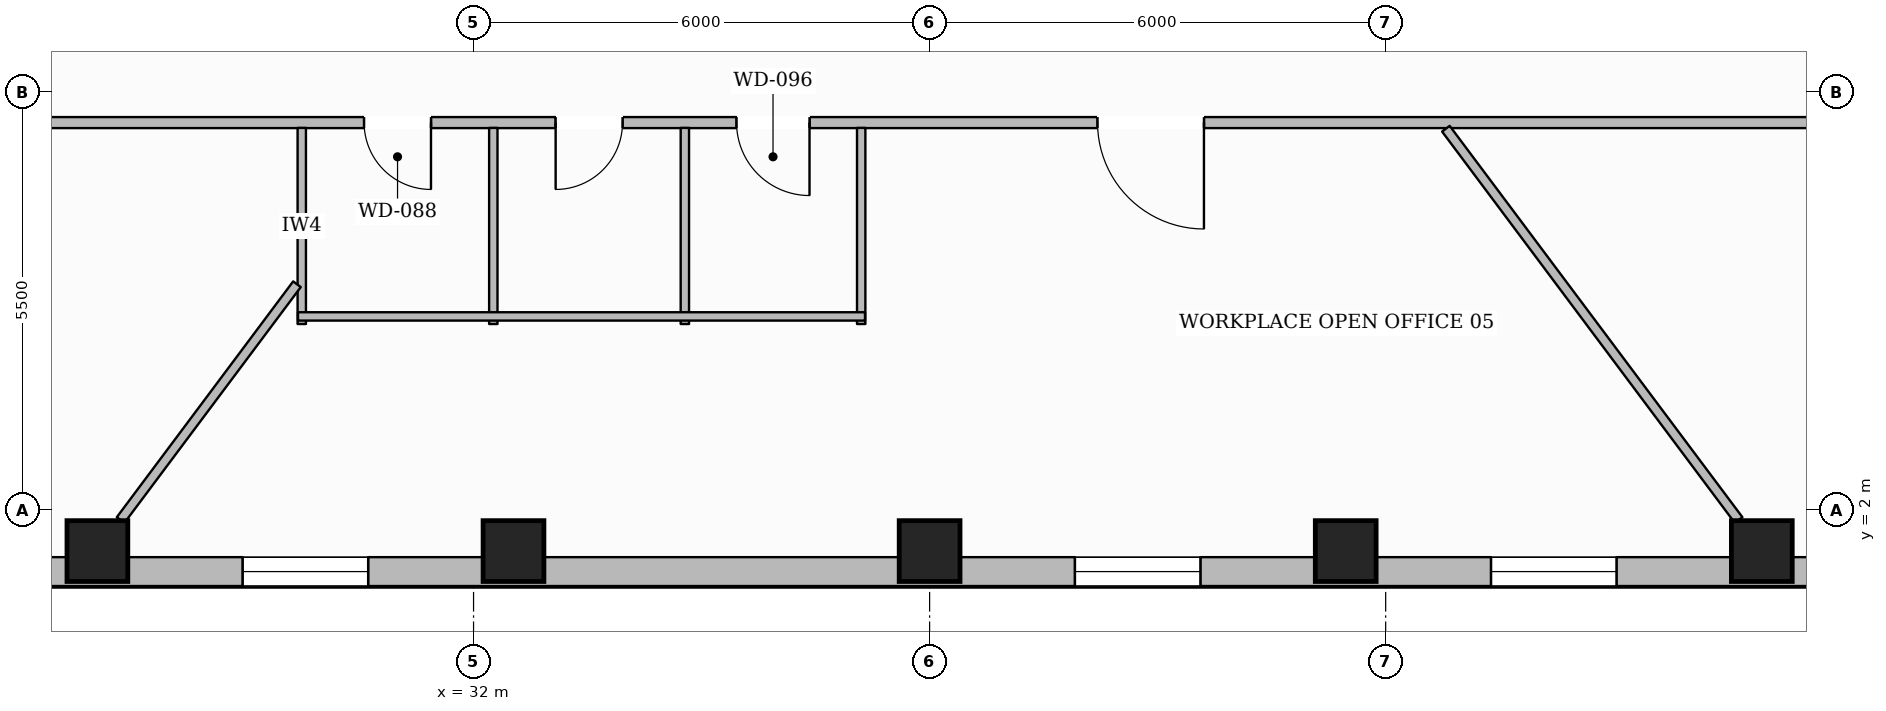
"""IFC4 building model, lengths in metres.
Left out: names, types, materials, properties, quantities, classifications, styles, units other than length and angle.
Written with IfcOpenShell. Run it as: python <this file> out.ifc"""

import sys

from ifc_helpers import new_model, si_unit, direction, frame, frame_2d, origin, origin_2d, place, context, subcontext, project, spatial, rectangle, hollow_rectangle, extrude, element, fill, save


model = new_model("IFC4")
c1 = context("Model", 3, precision=1e-05, world=origin(), true_north=direction((0.0, 1.0)))
c2 = subcontext(c1, "Body", "Model", "MODEL_VIEW")
j1 = project(units=[si_unit("LENGTHUNIT", "METRE"), si_unit("PLANEANGLEUNIT", "RADIAN")], contexts=[c1])
p1 = place(None, origin())
s1 = spatial("IfcSite", under=j1, at=p1, CompositionType="ELEMENT")
p2 = place(p1, origin())
s2 = spatial("IfcBuilding", under=s1, at=p2, CompositionType="ELEMENT")
p3 = place(p2, frame((0.0, 0.0, 29.1)))
s3 = spatial("IfcBuildingStorey", under=s2, at=p3, CompositionType="ELEMENT", Elevation=29.1)
for number, where, z_axis, x_axis in (
    (1, (27.051, 1.463, 0.0), (0.0, 0.0, 1.0), (1.0, 0.0, 0.0)),
    (2, (32.526, 1.463, 0.0), (0.0, 0.0, 1.0), (1.0, 0.0, 0.0)),
    (3, (38.0, 1.463, 0.0), (0.0, 0.0, 1.0), (1.0, 0.0, 0.0)),
    (4, (43.474, 1.463, 0.0), (0.0, 0.0, 1.0), (1.0, 0.0, 0.0)),
    (5, (48.949, 1.463, 0.0), (0.0, 0.0, 1.0), (1.0, 0.0, 0.0)),
):
    element("IfcColumn", number, at=place(p3, frame(where, z_axis=z_axis, x_axis=x_axis)), inside=s3, PredefinedType="COLUMN", context=c2, shape_type="SweptSolid", body=[
        extrude(hollow_rectangle(XDim=0.8, YDim=0.8, WallThickness=0.036, at=origin_2d()), origin(), (0.0, 0.0, 1.0), 3.59),
    ])
p4 = place(p3, frame((54.902, 1.193, 0.0), z_axis=(0.0, 0.0, 1.0), x_axis=(-1.0, 0.0, 0.0)))
e6 = element("IfcWall", 6, at=p4, inside=s3, PredefinedType="STANDARD", context=c2, shape_type="SweptSolid", body=[
    extrude(rectangle(XDim=33.804, YDim=0.38, at=frame_2d((16.902, 0.0))), origin(), (0.0, 0.0, 1.0), 2.97),
])
p5 = place(p4, frame((29.763, 0.0, 0.65)))
e7 = element("IfcOpeningElement", 7, at=p5, cuts=e6, PredefinedType="OPENING", context=c2, shape_type="SweptSolid", body=[
    extrude(rectangle(XDim=1.65, YDim=1.75, at=frame_2d((0.825, 0.875))), frame((0.0, 0.2, 0.0), z_axis=(0.0, -1.0, 0.0), x_axis=(1.0, 0.0, 0.0)), (0.0, 0.0, 1.0), 0.4),
])
p6 = place(p4, frame((24.288, 0.0, 0.65)))
e8 = element("IfcOpeningElement", 8, at=p6, cuts=e6, PredefinedType="OPENING", context=c2, shape_type="SweptSolid", body=[
    extrude(rectangle(XDim=1.65, YDim=1.75, at=frame_2d((0.825, 0.875))), frame((0.0, 0.2, 0.0), z_axis=(0.0, -1.0, 0.0), x_axis=(1.0, 0.0, 0.0)), (0.0, 0.0, 1.0), 0.4),
])
p7 = place(p4, frame((13.34, 0.0, 0.65)))
e9 = element("IfcOpeningElement", 9, at=p7, cuts=e6, PredefinedType="OPENING", context=c2, shape_type="SweptSolid", body=[
    extrude(rectangle(XDim=1.65, YDim=1.75, at=frame_2d((0.825, 0.875))), frame((0.0, 0.2, 0.0), z_axis=(0.0, -1.0, 0.0), x_axis=(1.0, 0.0, 0.0)), (0.0, 0.0, 1.0), 0.4),
])
p8 = place(p4, frame((7.865, 0.0, 0.65)))
e10 = element("IfcOpeningElement", 10, at=p8, cuts=e6, PredefinedType="OPENING", context=c2, shape_type="SweptSolid", body=[
    extrude(rectangle(XDim=1.65, YDim=1.75, at=frame_2d((0.825, 0.875))), frame((0.0, 0.2, 0.0), z_axis=(0.0, -1.0, 0.0), x_axis=(1.0, 0.0, 0.0)), (0.0, 0.0, 1.0), 0.4),
])
p9 = place(p4, frame((2.391, 0.0, 0.65)))
e11 = element("IfcOpeningElement", 11, at=p9, cuts=e6, PredefinedType="OPENING", context=c2, shape_type="SweptSolid", body=[
    extrude(rectangle(XDim=1.65, YDim=1.75, at=frame_2d((0.825, 0.875))), frame((0.0, 0.2, 0.0), z_axis=(0.0, -1.0, 0.0), x_axis=(1.0, 0.0, 0.0)), (0.0, 0.0, 1.0), 0.4),
])
p10 = place(p3, frame((49.92, 7.1, 0.0), z_axis=(0.0, 0.0, 1.0), x_axis=(-1.0, 0.0, 0.0)))
e12 = element("IfcWall", 12, at=p10, inside=s3, PredefinedType="PARTITIONING", context=c2, shape_type="SweptSolid", body=[
    extrude(rectangle(XDim=23.84, YDim=0.145, at=frame_2d((11.92, 0.0))), origin(), (0.0, 0.0, 1.0), 3.278),
])
p11 = place(p10, frame((18.48, 0.0, 0.0)))
e13 = element("IfcOpeningElement", 13, at=p11, cuts=e12, PredefinedType="OPENING", context=c2, shape_type="SweptSolid", body=[
    extrude(rectangle(XDim=0.88, YDim=2.1, at=frame_2d((0.44, 1.05))), frame((0.0, 0.083, 0.0), z_axis=(0.0, -1.0, 0.0), x_axis=(1.0, 0.0, 0.0)), (0.0, 0.0, 1.0), 0.165),
])
p12 = place(p10, frame((15.96, 0.0, 0.0)))
e14 = element("IfcOpeningElement", 14, at=p12, cuts=e12, PredefinedType="OPENING", context=c2, shape_type="SweptSolid", body=[
    extrude(rectangle(XDim=0.88, YDim=2.1, at=frame_2d((0.44, 1.05))), frame((0.0, 0.083, 0.0), z_axis=(0.0, -1.0, 0.0), x_axis=(1.0, 0.0, 0.0)), (0.0, 0.0, 1.0), 0.165),
])
p13 = place(p10, frame((13.5, 0.0, 0.0)))
e15 = element("IfcOpeningElement", 15, at=p13, cuts=e12, PredefinedType="OPENING", context=c2, shape_type="SweptSolid", body=[
    extrude(rectangle(XDim=0.96, YDim=2.1, at=frame_2d((0.48, 1.05))), frame((0.0, 0.083, 0.0), z_axis=(0.0, -1.0, 0.0), x_axis=(1.0, 0.0, 0.0)), (0.0, 0.0, 1.0), 0.165),
])
p14 = place(p10, frame((8.311, 0.0, 0.0)))
e16 = element("IfcOpeningElement", 16, at=p14, cuts=e12, PredefinedType="OPENING", context=c2, shape_type="SweptSolid", body=[
    extrude(rectangle(XDim=1.4, YDim=2.2, at=frame_2d((0.7, 1.1))), frame((0.0, 0.083, 0.0), z_axis=(0.0, -1.0, 0.0), x_axis=(1.0, 0.0, 0.0)), (0.0, 0.0, 1.0), 0.165),
])
for number, where, z_axis, x_axis in (
    (17, (29.74, 4.45, 0.0), (0.0, 0.0, 1.0), (0.0, 1.0, 0.0)),
    (18, (32.26, 4.45, 0.0), (0.0, 0.0, 1.0), (0.0, 1.0, 0.0)),
    (19, (34.78, 4.45, 0.0), (0.0, 0.0, 1.0), (0.0, 1.0, 0.0)),
    (20, (37.1, 4.45, 0.0), (0.0, 0.0, 1.0), (0.0, 1.0, 0.0)),
):
    element("IfcWall", number, at=place(p3, frame(where, z_axis=z_axis, x_axis=x_axis)), inside=s3, PredefinedType="PLUMBINGWALL", context=c2, shape_type="SweptSolid", body=[
        extrude(rectangle(XDim=2.58, YDim=0.11, at=frame_2d((1.29, 0.0))), origin(), (0.0, 0.0, 1.0), 3.59),
    ])
p15 = place(p3, frame((29.69, 4.55, 0.0), z_axis=(0.0, 0.0, 1.0), x_axis=(1.0, 0.0, 0.0)))
e21 = element("IfcWall", 21, at=p15, inside=s3, PredefinedType="PLUMBINGWALL", context=c2, shape_type="SweptSolid", body=[
    extrude(rectangle(XDim=7.46, YDim=0.11, at=frame_2d((3.73, 0.0))), origin(), (0.0, 0.0, 1.0), 3.59),
])
p16 = place(p3, frame((29.677, 4.973, 0.0), z_axis=(0.0, 0.0, 1.0), x_axis=(-0.598981151393, -0.800763123699, 0.0)))
e22 = element("IfcWall", 22, at=p16, inside=s3, PredefinedType="PARTITIONING", context=c2, shape_type="SweptSolid", body=[
    extrude(rectangle(XDim=3.874, YDim=0.125, at=frame_2d((1.937, 0.0))), origin(), (0.0, 0.0, 1.0), 3.59),
])
p17 = place(p3, frame((44.792, 7.02, 0.0), z_axis=(0.0, 0.0, 1.0), x_axis=(0.598984945208, -0.800760285863, 0.0)))
e23 = element("IfcWall", 23, at=p17, inside=s3, PredefinedType="PARTITIONING", context=c2, shape_type="SweptSolid", body=[
    extrude(rectangle(XDim=6.43, YDim=0.125, at=frame_2d((3.215, 0.0))), origin(), (0.0, 0.0, 1.0), 3.59),
])
p18 = place(p6, origin())
e24 = element("IfcWindow", 24, at=p18, inside=s3, PartitioningType="SINGLE_PANEL", PredefinedType="WINDOW", context=c2, shape_type="SweptSolid", body=[
    extrude(rectangle(XDim=1.65, YDim=1.75, at=frame_2d((0.825, 0.875))), frame((0.0, 0.03, 0.0), z_axis=(0.0, -1.0, 0.0), x_axis=(1.0, 0.0, 0.0)), (0.0, 0.0, 1.0), 0.06),
])
fill(e8, e24)
p19 = place(p7, origin())
e25 = element("IfcWindow", 25, at=p19, inside=s3, PartitioningType="SINGLE_PANEL", PredefinedType="WINDOW", context=c2, shape_type="SweptSolid", body=[
    extrude(rectangle(XDim=1.65, YDim=1.75, at=frame_2d((0.825, 0.875))), frame((0.0, 0.03, 0.0), z_axis=(0.0, -1.0, 0.0), x_axis=(1.0, 0.0, 0.0)), (0.0, 0.0, 1.0), 0.06),
])
fill(e9, e25)
p20 = place(p8, origin())
e26 = element("IfcWindow", 26, at=p20, inside=s3, PartitioningType="SINGLE_PANEL", PredefinedType="WINDOW", context=c2, shape_type="SweptSolid", body=[
    extrude(rectangle(XDim=1.65, YDim=1.75, at=frame_2d((0.825, 0.875))), frame((0.0, 0.03, 0.0), z_axis=(0.0, -1.0, 0.0), x_axis=(1.0, 0.0, 0.0)), (0.0, 0.0, 1.0), 0.06),
])
fill(e10, e26)
p21 = place(p11, origin())
e27 = element("IfcDoor", 27, at=p21, inside=s3, OperationType="SINGLE_SWING_LEFT", PredefinedType="DOOR", context=c2, shape_type="SweptSolid", body=[
    extrude(rectangle(XDim=0.88, YDim=2.1, at=frame_2d((0.44, 1.05))), frame((0.0, 0.025, 0.0), z_axis=(0.0, -1.0, 0.0), x_axis=(1.0, 0.0, 0.0)), (0.0, 0.0, 1.0), 0.05),
])
fill(e13, e27)
p22 = place(p12, origin())
e28 = element("IfcDoor", 28, at=p22, inside=s3, OperationType="SINGLE_SWING_RIGHT", PredefinedType="DOOR", context=c2, shape_type="SweptSolid", body=[
    extrude(rectangle(XDim=0.88, YDim=2.1, at=frame_2d((0.44, 1.05))), frame((0.0, 0.025, 0.0), z_axis=(0.0, -1.0, 0.0), x_axis=(1.0, 0.0, 0.0)), (0.0, 0.0, 1.0), 0.05),
])
fill(e14, e28)
p23 = place(p13, origin())
e29 = element("IfcDoor", 29, at=p23, inside=s3, OperationType="SINGLE_SWING_LEFT", PredefinedType="DOOR", context=c2, shape_type="SweptSolid", body=[
    extrude(rectangle(XDim=0.96, YDim=2.1, at=frame_2d((0.48, 1.05))), frame((0.0, 0.025, 0.0), z_axis=(0.0, -1.0, 0.0), x_axis=(1.0, 0.0, 0.0)), (0.0, 0.0, 1.0), 0.05),
])
fill(e15, e29)
p24 = place(p14, origin())
e30 = element("IfcDoor", 30, at=p24, inside=s3, OperationType="SINGLE_SWING_LEFT", PredefinedType="DOOR", context=c2, shape_type="SweptSolid", body=[
    extrude(rectangle(XDim=1.4, YDim=2.2, at=frame_2d((0.7, 1.1))), frame((0.0, 0.025, 0.0), z_axis=(0.0, -1.0, 0.0), x_axis=(1.0, 0.0, 0.0)), (0.0, 0.0, 1.0), 0.05),
])
fill(e16, e30)
save(model, sys.argv[1])
